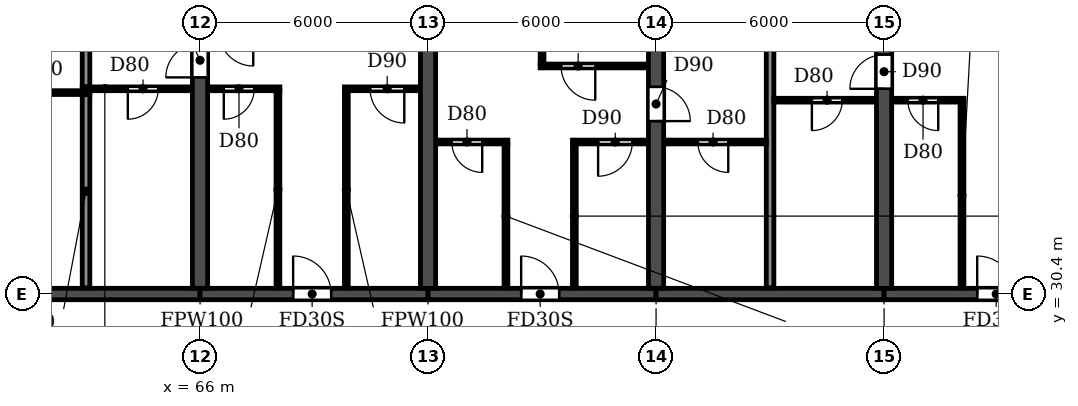
"""IFC4 building model, lengths in metres.
Left out: names, types, materials, properties, quantities, classifications, styles, units other than length and angle.
Written with IfcOpenShell. Run it as: python <this file> out.ifc"""

import sys

from ifc_helpers import new_model, si_unit, direction, frame, frame_2d, origin, place, context, subcontext, project, spatial, rectangle, extrude, element, fill, save


model = new_model("IFC4")
c1 = context("Model", 3, precision=1e-05, world=origin(), true_north=direction((0.0, 1.0)))
c2 = subcontext(c1, "Body", "Model", "MODEL_VIEW")
j1 = project(units=[si_unit("LENGTHUNIT", "METRE"), si_unit("PLANEANGLEUNIT", "RADIAN")], contexts=[c1])
p1 = place(None, origin())
s1 = spatial("IfcSite", under=j1, at=p1, CompositionType="ELEMENT")
p2 = place(p1, origin())
s2 = spatial("IfcBuilding", under=s1, at=p2, CompositionType="ELEMENT")
p3 = place(p2, frame((0.0, 0.0, 49.8)))
s3 = spatial("IfcBuildingStorey", under=s2, at=p3, CompositionType="ELEMENT", Elevation=49.8)
p4 = place(p3, frame((66.0, 30.55, 0.0), z_axis=(0.0, 0.0, 1.0), x_axis=(0.0, 1.0, 0.0)))
e1 = element("IfcWall", 1, at=p4, inside=s3, PredefinedType="SHEAR", context=c2, shape_type="SweptSolid", body=[
    extrude(rectangle(XDim=14.05, YDim=0.4, at=frame_2d((7.025, 0.0))), origin(), (0.0, 0.0, 1.0), 3.0),
])
p5 = place(p4, frame((5.55, 0.0, 0.0)))
e2 = element("IfcOpeningElement", 2, at=p5, cuts=e1, PredefinedType="OPENING", context=c2, shape_type="SweptSolid", body=[
    extrude(rectangle(XDim=0.9, YDim=2.1, at=frame_2d((0.45, 1.05))), frame((0.0, 0.21, 0.0), z_axis=(0.0, -1.0, 0.0), x_axis=(1.0, 0.0, 0.0)), (0.0, 0.0, 1.0), 0.42),
])
p6 = place(p3, frame((72.0, 30.55, 0.0), z_axis=(0.0, 0.0, 1.0), x_axis=(0.0, 1.0, 0.0)))
e3 = element("IfcWall", 3, at=p6, inside=s3, PredefinedType="SHEAR", context=c2, shape_type="SweptSolid", body=[
    extrude(rectangle(XDim=14.05, YDim=0.4, at=frame_2d((7.025, 0.0))), origin(), (0.0, 0.0, 1.0), 3.0),
])
p7 = place(p3, frame((78.0, 30.55, 0.0), z_axis=(0.0, 0.0, 1.0), x_axis=(0.0, 1.0, 0.0)))
e4 = element("IfcWall", 4, at=p7, inside=s3, PredefinedType="SHEAR", context=c2, shape_type="SweptSolid", body=[
    extrude(rectangle(XDim=14.05, YDim=0.4, at=frame_2d((7.025, 0.0))), origin(), (0.0, 0.0, 1.0), 3.0),
])
p8 = place(p7, frame((4.4, 0.0, 0.0)))
e5 = element("IfcOpeningElement", 5, at=p8, cuts=e4, PredefinedType="OPENING", context=c2, shape_type="SweptSolid", body=[
    extrude(rectangle(XDim=0.9, YDim=2.1, at=frame_2d((0.45, 1.05))), frame((0.0, 0.21, 0.0), z_axis=(0.0, -1.0, 0.0), x_axis=(1.0, 0.0, 0.0)), (0.0, 0.0, 1.0), 0.42),
])
p9 = place(p3, frame((84.0, 30.55, 0.0), z_axis=(0.0, 0.0, 1.0), x_axis=(0.0, 1.0, 0.0)))
e6 = element("IfcWall", 6, at=p9, inside=s3, PredefinedType="SHEAR", context=c2, shape_type="SweptSolid", body=[
    extrude(rectangle(XDim=14.05, YDim=0.4, at=frame_2d((7.025, 0.0))), origin(), (0.0, 0.0, 1.0), 3.0),
])
p10 = place(p9, frame((5.25, 0.0, 0.0)))
e7 = element("IfcOpeningElement", 7, at=p10, cuts=e6, PredefinedType="OPENING", context=c2, shape_type="SweptSolid", body=[
    extrude(rectangle(XDim=0.9, YDim=2.1, at=frame_2d((0.45, 1.05))), frame((0.0, 0.21, 0.0), z_axis=(0.0, -1.0, 0.0), x_axis=(1.0, 0.0, 0.0)), (0.0, 0.0, 1.0), 0.42),
])
p11 = place(p3, frame((60.0, 30.4, 0.0), z_axis=(0.0, 0.0, 1.0), x_axis=(1.0, 0.0, 0.0)))
e8 = element("IfcWall", 8, at=p11, inside=s3, PredefinedType="SHEAR", context=c2, shape_type="SweptSolid", body=[
    extrude(rectangle(XDim=6.0, YDim=0.3, at=frame_2d((3.0, 0.0))), origin(), (0.0, 0.0, 1.0), 2.4),
])
p12 = place(p3, frame((66.0, 30.4, 0.0), z_axis=(0.0, 0.0, 1.0), x_axis=(1.0, 0.0, 0.0)))
e9 = element("IfcWall", 9, at=p12, inside=s3, PredefinedType="SHEAR", context=c2, shape_type="SweptSolid", body=[
    extrude(rectangle(XDim=6.0, YDim=0.3, at=frame_2d((3.0, 0.0))), origin(), (0.0, 0.0, 1.0), 2.4),
])
p13 = place(p12, frame((2.45, 0.0, 0.0)))
e10 = element("IfcOpeningElement", 10, at=p13, cuts=e9, PredefinedType="OPENING", context=c2, shape_type="SweptSolid", body=[
    extrude(rectangle(XDim=1.0, YDim=2.1, at=frame_2d((0.5, 1.05))), frame((0.0, 0.16, 0.0), z_axis=(0.0, -1.0, 0.0), x_axis=(1.0, 0.0, 0.0)), (0.0, 0.0, 1.0), 0.32),
])
p14 = place(p3, frame((72.0, 30.4, 0.0), z_axis=(0.0, 0.0, 1.0), x_axis=(1.0, 0.0, 0.0)))
e11 = element("IfcWall", 11, at=p14, inside=s3, PredefinedType="SHEAR", context=c2, shape_type="SweptSolid", body=[
    extrude(rectangle(XDim=6.0, YDim=0.3, at=frame_2d((3.0, 0.0))), origin(), (0.0, 0.0, 1.0), 2.4),
])
p15 = place(p14, frame((2.45, 0.0, 0.0)))
e12 = element("IfcOpeningElement", 12, at=p15, cuts=e11, PredefinedType="OPENING", context=c2, shape_type="SweptSolid", body=[
    extrude(rectangle(XDim=1.0, YDim=2.1, at=frame_2d((0.5, 1.05))), frame((0.0, 0.16, 0.0), z_axis=(0.0, -1.0, 0.0), x_axis=(1.0, 0.0, 0.0)), (0.0, 0.0, 1.0), 0.32),
])
p16 = place(p3, frame((78.0, 30.4, 0.0), z_axis=(0.0, 0.0, 1.0), x_axis=(1.0, 0.0, 0.0)))
e13 = element("IfcWall", 13, at=p16, inside=s3, PredefinedType="SHEAR", context=c2, shape_type="SweptSolid", body=[
    extrude(rectangle(XDim=6.0, YDim=0.3, at=frame_2d((3.0, 0.0))), origin(), (0.0, 0.0, 1.0), 2.4),
])
p17 = place(p3, frame((84.0, 30.4, 0.0), z_axis=(0.0, 0.0, 1.0), x_axis=(1.0, 0.0, 0.0)))
e14 = element("IfcWall", 14, at=p17, inside=s3, PredefinedType="SHEAR", context=c2, shape_type="SweptSolid", body=[
    extrude(rectangle(XDim=6.0, YDim=0.3, at=frame_2d((3.0, 0.0))), origin(), (0.0, 0.0, 1.0), 2.4),
])
p18 = place(p17, frame((2.45, 0.0, 0.0)))
e15 = element("IfcOpeningElement", 15, at=p18, cuts=e14, PredefinedType="OPENING", context=c2, shape_type="SweptSolid", body=[
    extrude(rectangle(XDim=1.0, YDim=2.1, at=frame_2d((0.5, 1.05))), frame((0.0, 0.16, 0.0), z_axis=(0.0, -1.0, 0.0), x_axis=(1.0, 0.0, 0.0)), (0.0, 0.0, 1.0), 0.32),
])
p19 = place(p3, frame((63.0, 30.56, 0.0), z_axis=(0.0, 0.0, 1.0), x_axis=(0.0, 1.0, 0.0)))
e16 = element("IfcWall", 16, at=p19, inside=s3, PredefinedType="PARTITIONING", context=c2, shape_type="SweptSolid", body=[
    extrude(rectangle(XDim=5.09, YDim=0.2, at=frame_2d((2.545, 0.0))), origin(), (0.0, 0.0, 1.0), 3.0),
])
p20 = place(p3, frame((63.0, 35.85, 0.0), z_axis=(0.0, 0.0, 1.0), x_axis=(0.0, 1.0, 0.0)))
e17 = element("IfcWall", 17, at=p20, inside=s3, PredefinedType="PARTITIONING", context=c2, shape_type="SweptSolid", body=[
    extrude(rectangle(XDim=8.89, YDim=0.2, at=frame_2d((4.445, 0.0))), origin(), (0.0, 0.0, 1.0), 3.0),
])
p21 = place(p3, frame((81.0, 30.56, 0.0), z_axis=(0.0, 0.0, 1.0), x_axis=(0.0, 1.0, 0.0)))
e18 = element("IfcWall", 18, at=p21, inside=s3, PredefinedType="PARTITIONING", context=c2, shape_type="SweptSolid", body=[
    extrude(rectangle(XDim=14.18, YDim=0.2, at=frame_2d((7.09, 0.0))), origin(), (0.0, 0.0, 1.0), 3.0),
])
p22 = place(p3, frame((72.21, 34.4, 0.0), z_axis=(0.0, 0.0, 1.0), x_axis=(1.0, 0.0, 0.0)))
e19 = element("IfcWall", 19, at=p22, inside=s3, PredefinedType="PARTITIONING", context=c2, shape_type="SweptSolid", body=[
    extrude(rectangle(XDim=1.89, YDim=0.1, at=frame_2d((0.945, 0.0))), origin(), (0.0, 0.0, 1.0), 3.0),
])
p23 = place(p22, frame((0.415, 0.0, 0.0)))
e20 = element("IfcOpeningElement", 20, at=p23, cuts=e19, PredefinedType="OPENING", context=c2, shape_type="SweptSolid", body=[
    extrude(rectangle(XDim=0.8, YDim=2.1, at=frame_2d((0.4, 1.05))), frame((0.0, 0.06, 0.0), z_axis=(0.0, -1.0, 0.0), x_axis=(1.0, 0.0, 0.0)), (0.0, 0.0, 1.0), 0.12),
])
p24 = place(p3, frame((75.8, 34.4, 0.0), z_axis=(0.0, 0.0, 1.0), x_axis=(1.0, 0.0, 0.0)))
e21 = element("IfcWall", 21, at=p24, inside=s3, PredefinedType="PARTITIONING", context=c2, shape_type="SweptSolid", body=[
    extrude(rectangle(XDim=1.99, YDim=0.1, at=frame_2d((0.995, 0.0))), origin(), (0.0, 0.0, 1.0), 3.0),
])
p25 = place(p24, frame((0.675, 0.0, 0.0)))
e22 = element("IfcOpeningElement", 22, at=p25, cuts=e21, PredefinedType="OPENING", context=c2, shape_type="SweptSolid", body=[
    extrude(rectangle(XDim=0.9, YDim=2.1, at=frame_2d((0.45, 1.05))), frame((0.0, 0.06, 0.0), z_axis=(0.0, -1.0, 0.0), x_axis=(1.0, 0.0, 0.0)), (0.0, 0.0, 1.0), 0.12),
])
p26 = place(p3, frame((78.21, 34.4, 0.0), z_axis=(0.0, 0.0, 1.0), x_axis=(1.0, 0.0, 0.0)))
e23 = element("IfcWall", 23, at=p26, inside=s3, PredefinedType="PARTITIONING", context=c2, shape_type="SweptSolid", body=[
    extrude(rectangle(XDim=2.69, YDim=0.1, at=frame_2d((1.345, 0.0))), origin(), (0.0, 0.0, 1.0), 3.0),
])
p27 = place(p26, frame((0.89, 0.0, 0.0)))
e24 = element("IfcOpeningElement", 24, at=p27, cuts=e23, PredefinedType="OPENING", context=c2, shape_type="SweptSolid", body=[
    extrude(rectangle(XDim=0.8, YDim=2.1, at=frame_2d((0.4, 1.05))), frame((0.0, 0.06, 0.0), z_axis=(0.0, -1.0, 0.0), x_axis=(1.0, 0.0, 0.0)), (0.0, 0.0, 1.0), 0.12),
])
p28 = place(p3, frame((81.1, 35.5, 0.0), z_axis=(0.0, 0.0, 1.0), x_axis=(1.0, 0.0, 0.0)))
e25 = element("IfcWall", 25, at=p28, inside=s3, PredefinedType="PARTITIONING", context=c2, shape_type="SweptSolid", body=[
    extrude(rectangle(XDim=2.69, YDim=0.1, at=frame_2d((1.345, 0.0))), origin(), (0.0, 0.0, 1.0), 3.0),
])
p29 = place(p28, frame((1.0, 0.0, 0.0)))
e26 = element("IfcOpeningElement", 26, at=p29, cuts=e25, PredefinedType="OPENING", context=c2, shape_type="SweptSolid", body=[
    extrude(rectangle(XDim=0.8, YDim=2.1, at=frame_2d((0.4, 1.05))), frame((0.0, 0.06, 0.0), z_axis=(0.0, -1.0, 0.0), x_axis=(1.0, 0.0, 0.0)), (0.0, 0.0, 1.0), 0.12),
])
p30 = place(p3, frame((84.21, 35.5, 0.0), z_axis=(0.0, 0.0, 1.0), x_axis=(1.0, 0.0, 0.0)))
e27 = element("IfcWall", 27, at=p30, inside=s3, PredefinedType="PARTITIONING", context=c2, shape_type="SweptSolid", body=[
    extrude(rectangle(XDim=1.89, YDim=0.1, at=frame_2d((0.945, 0.0))), origin(), (0.0, 0.0, 1.0), 3.0),
])
p31 = place(p30, frame((0.415, 0.0, 0.0)))
e28 = element("IfcOpeningElement", 28, at=p31, cuts=e27, PredefinedType="OPENING", context=c2, shape_type="SweptSolid", body=[
    extrude(rectangle(XDim=0.8, YDim=2.1, at=frame_2d((0.4, 1.05))), frame((0.0, 0.06, 0.0), z_axis=(0.0, -1.0, 0.0), x_axis=(1.0, 0.0, 0.0)), (0.0, 0.0, 1.0), 0.12),
])
p32 = place(p3, frame((60.21, 35.7, 0.0), z_axis=(0.0, 0.0, 1.0), x_axis=(1.0, 0.0, 0.0)))
e29 = element("IfcWall", 29, at=p32, inside=s3, PredefinedType="PARTITIONING", context=c2, shape_type="SweptSolid", body=[
    extrude(rectangle(XDim=2.89, YDim=0.1, at=frame_2d((1.445, 0.0))), origin(), (0.0, 0.0, 1.0), 3.0),
])
p33 = place(p32, frame((0.89, 0.0, 0.0)))
e30 = element("IfcOpeningElement", 30, at=p33, cuts=e29, PredefinedType="OPENING", context=c2, shape_type="SweptSolid", body=[
    extrude(rectangle(XDim=0.8, YDim=2.1, at=frame_2d((0.4, 1.05))), frame((0.0, 0.06, 0.0), z_axis=(0.0, -1.0, 0.0), x_axis=(1.0, 0.0, 0.0)), (0.0, 0.0, 1.0), 0.12),
])
p34 = place(p3, frame((62.9, 35.8, 0.0), z_axis=(0.0, 0.0, 1.0), x_axis=(1.0, 0.0, 0.0)))
e31 = element("IfcWall", 31, at=p34, inside=s3, PredefinedType="PARTITIONING", context=c2, shape_type="SweptSolid", body=[
    extrude(rectangle(XDim=2.89, YDim=0.1, at=frame_2d((1.445, 0.0))), origin(), (0.0, 0.0, 1.0), 3.0),
])
p35 = place(p34, frame((1.2, 0.0, 0.0)))
e32 = element("IfcOpeningElement", 32, at=p35, cuts=e31, PredefinedType="OPENING", context=c2, shape_type="SweptSolid", body=[
    extrude(rectangle(XDim=0.8, YDim=2.1, at=frame_2d((0.4, 1.05))), frame((0.0, 0.06, 0.0), z_axis=(0.0, -1.0, 0.0), x_axis=(1.0, 0.0, 0.0)), (0.0, 0.0, 1.0), 0.12),
])
p36 = place(p3, frame((66.21, 35.8, 0.0), z_axis=(0.0, 0.0, 1.0), x_axis=(1.0, 0.0, 0.0)))
e33 = element("IfcWall", 33, at=p36, inside=s3, PredefinedType="PARTITIONING", context=c2, shape_type="SweptSolid", body=[
    extrude(rectangle(XDim=1.89, YDim=0.1, at=frame_2d((0.945, 0.0))), origin(), (0.0, 0.0, 1.0), 3.0),
])
p37 = place(p36, frame((0.415, 0.0, 0.0)))
e34 = element("IfcOpeningElement", 34, at=p37, cuts=e33, PredefinedType="OPENING", context=c2, shape_type="SweptSolid", body=[
    extrude(rectangle(XDim=0.8, YDim=2.1, at=frame_2d((0.4, 1.05))), frame((0.0, 0.06, 0.0), z_axis=(0.0, -1.0, 0.0), x_axis=(1.0, 0.0, 0.0)), (0.0, 0.0, 1.0), 0.12),
])
p38 = place(p3, frame((69.8, 35.8, 0.0), z_axis=(0.0, 0.0, 1.0), x_axis=(1.0, 0.0, 0.0)))
e35 = element("IfcWall", 35, at=p38, inside=s3, PredefinedType="PARTITIONING", context=c2, shape_type="SweptSolid", body=[
    extrude(rectangle(XDim=1.99, YDim=0.1, at=frame_2d((0.995, 0.0))), origin(), (0.0, 0.0, 1.0), 3.0),
])
p39 = place(p38, frame((0.675, 0.0, 0.0)))
e36 = element("IfcOpeningElement", 36, at=p39, cuts=e35, PredefinedType="OPENING", context=c2, shape_type="SweptSolid", body=[
    extrude(rectangle(XDim=0.9, YDim=2.1, at=frame_2d((0.45, 1.05))), frame((0.0, 0.06, 0.0), z_axis=(0.0, -1.0, 0.0), x_axis=(1.0, 0.0, 0.0)), (0.0, 0.0, 1.0), 0.12),
])
p40 = place(p3, frame((74.95, 36.4, 0.0), z_axis=(0.0, 0.0, 1.0), x_axis=(1.0, 0.0, 0.0)))
e37 = element("IfcWall", 37, at=p40, inside=s3, PredefinedType="PARTITIONING", context=c2, shape_type="SweptSolid", body=[
    extrude(rectangle(XDim=2.84, YDim=0.1, at=frame_2d((1.42, 0.0))), origin(), (0.0, 0.0, 1.0), 3.0),
])
p41 = place(p40, frame((0.55, 0.0, 0.0)))
e38 = element("IfcOpeningElement", 38, at=p41, cuts=e37, PredefinedType="OPENING", context=c2, shape_type="SweptSolid", body=[
    extrude(rectangle(XDim=0.9, YDim=2.1, at=frame_2d((0.45, 1.05))), frame((0.0, 0.06, 0.0), z_axis=(0.0, -1.0, 0.0), x_axis=(1.0, 0.0, 0.0)), (0.0, 0.0, 1.0), 0.12),
])
for number, where, z_axis, x_axis in (
    (39, (68.05, 30.56, 0.0), (0.0, 0.0, 1.0), (0.0, 1.0, 0.0)),
    (40, (69.85, 30.56, 0.0), (0.0, 0.0, 1.0), (0.0, 1.0, 0.0)),
):
    element("IfcWall", number, at=place(p3, frame(where, z_axis=z_axis, x_axis=x_axis)), inside=s3, PredefinedType="PARTITIONING", context=c2, shape_type="SweptSolid", body=[
        extrude(rectangle(XDim=5.19, YDim=0.1, at=frame_2d((2.595, 0.0))), origin(), (0.0, 0.0, 1.0), 3.0),
    ])
p42 = place(p3, frame((74.05, 30.56, 0.0), z_axis=(0.0, 0.0, 1.0), x_axis=(0.0, 1.0, 0.0)))
e41 = element("IfcWall", 41, at=p42, inside=s3, PredefinedType="PARTITIONING", context=c2, shape_type="SweptSolid", body=[
    extrude(rectangle(XDim=3.79, YDim=0.1, at=frame_2d((1.895, 0.0))), origin(), (0.0, 0.0, 1.0), 3.0),
])
p43 = place(p3, frame((75.0, 36.45, 0.0), z_axis=(0.0, 0.0, 1.0), x_axis=(0.0, 1.0, 0.0)))
e42 = element("IfcWall", 42, at=p43, inside=s3, PredefinedType="PARTITIONING", context=c2, shape_type="SweptSolid", body=[
    extrude(rectangle(XDim=8.29, YDim=0.1, at=frame_2d((4.145, 0.0))), origin(), (0.0, 0.0, 1.0), 3.0),
])
p44 = place(p3, frame((75.85, 30.56, 0.0), z_axis=(0.0, 0.0, 1.0), x_axis=(0.0, 1.0, 0.0)))
e43 = element("IfcWall", 43, at=p44, inside=s3, PredefinedType="PARTITIONING", context=c2, shape_type="SweptSolid", body=[
    extrude(rectangle(XDim=3.79, YDim=0.1, at=frame_2d((1.895, 0.0))), origin(), (0.0, 0.0, 1.0), 3.0),
])
p45 = place(p3, frame((86.05, 30.56, 0.0), z_axis=(0.0, 0.0, 1.0), x_axis=(0.0, 1.0, 0.0)))
e44 = element("IfcWall", 44, at=p45, inside=s3, PredefinedType="PARTITIONING", context=c2, shape_type="SweptSolid", body=[
    extrude(rectangle(XDim=4.89, YDim=0.1, at=frame_2d((2.445, 0.0))), origin(), (0.0, 0.0, 1.0), 3.0),
])
p46 = place(p35, frame((0.8, 0.0, 0.0), z_axis=(0.0, 0.0, 1.0), x_axis=(-1.0, 0.0, 0.0)))
e45 = element("IfcDoor", 45, at=p46, inside=s3, OperationType="SINGLE_SWING_RIGHT", PredefinedType="DOOR", context=c2, shape_type="SweptSolid", body=[
    extrude(rectangle(XDim=0.8, YDim=2.1, at=frame_2d((0.4, 1.05))), frame((0.0, 0.025, 0.0), z_axis=(0.0, -1.0, 0.0), x_axis=(1.0, 0.0, 0.0)), (0.0, 0.0, 1.0), 0.05),
])
fill(e32, e45)
p47 = place(p5, origin())
e46 = element("IfcDoor", 46, at=p47, inside=s3, OperationType="SINGLE_SWING_LEFT", PredefinedType="DOOR", context=c2, shape_type="SweptSolid", body=[
    extrude(rectangle(XDim=0.9, YDim=2.1, at=frame_2d((0.45, 1.05))), frame((0.0, 0.025, 0.0), z_axis=(0.0, -1.0, 0.0), x_axis=(1.0, 0.0, 0.0)), (0.0, 0.0, 1.0), 0.05),
])
fill(e2, e46)
p48 = place(p37, frame((0.8, 0.0, 0.0), z_axis=(0.0, 0.0, 1.0), x_axis=(-1.0, 0.0, 0.0)))
e47 = element("IfcDoor", 47, at=p48, inside=s3, OperationType="SINGLE_SWING_RIGHT", PredefinedType="DOOR", context=c2, shape_type="SweptSolid", body=[
    extrude(rectangle(XDim=0.8, YDim=2.1, at=frame_2d((0.4, 1.05))), frame((0.0, 0.025, 0.0), z_axis=(0.0, -1.0, 0.0), x_axis=(1.0, 0.0, 0.0)), (0.0, 0.0, 1.0), 0.05),
])
fill(e34, e47)
p49 = place(p13, origin())
e48 = element("IfcDoor", 48, at=p49, inside=s3, OperationType="SINGLE_SWING_LEFT", PredefinedType="DOOR", context=c2, shape_type="SweptSolid", body=[
    extrude(rectangle(XDim=1.0, YDim=2.1, at=frame_2d((0.5, 1.05))), frame((0.0, 0.025, 0.0), z_axis=(0.0, -1.0, 0.0), x_axis=(1.0, 0.0, 0.0)), (0.0, 0.0, 1.0), 0.05),
])
fill(e10, e48)
p50 = place(p39, frame((0.9, 0.0, 0.0), z_axis=(0.0, 0.0, 1.0), x_axis=(-1.0, 0.0, 0.0)))
e49 = element("IfcDoor", 49, at=p50, inside=s3, OperationType="SINGLE_SWING_LEFT", PredefinedType="DOOR", context=c2, shape_type="SweptSolid", body=[
    extrude(rectangle(XDim=0.9, YDim=2.1, at=frame_2d((0.45, 1.05))), frame((0.0, 0.025, 0.0), z_axis=(0.0, -1.0, 0.0), x_axis=(1.0, 0.0, 0.0)), (0.0, 0.0, 1.0), 0.05),
])
fill(e36, e49)
p51 = place(p27, frame((0.8, 0.0, 0.0), z_axis=(0.0, 0.0, 1.0), x_axis=(-1.0, 0.0, 0.0)))
e50 = element("IfcDoor", 50, at=p51, inside=s3, OperationType="SINGLE_SWING_LEFT", PredefinedType="DOOR", context=c2, shape_type="SweptSolid", body=[
    extrude(rectangle(XDim=0.8, YDim=2.1, at=frame_2d((0.4, 1.05))), frame((0.0, 0.025, 0.0), z_axis=(0.0, -1.0, 0.0), x_axis=(1.0, 0.0, 0.0)), (0.0, 0.0, 1.0), 0.05),
])
fill(e24, e50)
p52 = place(p23, frame((0.8, 0.0, 0.0), z_axis=(0.0, 0.0, 1.0), x_axis=(-1.0, 0.0, 0.0)))
e51 = element("IfcDoor", 51, at=p52, inside=s3, OperationType="SINGLE_SWING_LEFT", PredefinedType="DOOR", context=c2, shape_type="SweptSolid", body=[
    extrude(rectangle(XDim=0.8, YDim=2.1, at=frame_2d((0.4, 1.05))), frame((0.0, 0.025, 0.0), z_axis=(0.0, -1.0, 0.0), x_axis=(1.0, 0.0, 0.0)), (0.0, 0.0, 1.0), 0.05),
])
fill(e20, e51)
p53 = place(p15, origin())
e52 = element("IfcDoor", 52, at=p53, inside=s3, OperationType="SINGLE_SWING_LEFT", PredefinedType="DOOR", context=c2, shape_type="SweptSolid", body=[
    extrude(rectangle(XDim=1.0, YDim=2.1, at=frame_2d((0.5, 1.05))), frame((0.0, 0.025, 0.0), z_axis=(0.0, -1.0, 0.0), x_axis=(1.0, 0.0, 0.0)), (0.0, 0.0, 1.0), 0.05),
])
fill(e12, e52)
p54 = place(p41, frame((0.9, 0.0, 0.0), z_axis=(0.0, 0.0, 1.0), x_axis=(-1.0, 0.0, 0.0)))
e53 = element("IfcDoor", 53, at=p54, inside=s3, OperationType="SINGLE_SWING_LEFT", PredefinedType="DOOR", context=c2, shape_type="SweptSolid", body=[
    extrude(rectangle(XDim=0.9, YDim=2.1, at=frame_2d((0.45, 1.05))), frame((0.0, 0.025, 0.0), z_axis=(0.0, -1.0, 0.0), x_axis=(1.0, 0.0, 0.0)), (0.0, 0.0, 1.0), 0.05),
])
fill(e38, e53)
p55 = place(p25, frame((0.9, 0.0, 0.0), z_axis=(0.0, 0.0, 1.0), x_axis=(-1.0, 0.0, 0.0)))
e54 = element("IfcDoor", 54, at=p55, inside=s3, OperationType="SINGLE_SWING_RIGHT", PredefinedType="DOOR", context=c2, shape_type="SweptSolid", body=[
    extrude(rectangle(XDim=0.9, YDim=2.1, at=frame_2d((0.45, 1.05))), frame((0.0, 0.025, 0.0), z_axis=(0.0, -1.0, 0.0), x_axis=(1.0, 0.0, 0.0)), (0.0, 0.0, 1.0), 0.05),
])
fill(e22, e54)
p56 = place(p8, frame((0.9, 0.0, 0.0), z_axis=(0.0, 0.0, 1.0), x_axis=(-1.0, 0.0, 0.0)))
e55 = element("IfcDoor", 55, at=p56, inside=s3, OperationType="SINGLE_SWING_RIGHT", PredefinedType="DOOR", context=c2, shape_type="SweptSolid", body=[
    extrude(rectangle(XDim=0.9, YDim=2.1, at=frame_2d((0.45, 1.05))), frame((0.0, 0.025, 0.0), z_axis=(0.0, -1.0, 0.0), x_axis=(1.0, 0.0, 0.0)), (0.0, 0.0, 1.0), 0.05),
])
fill(e5, e55)
p57 = place(p29, frame((0.8, 0.0, 0.0), z_axis=(0.0, 0.0, 1.0), x_axis=(-1.0, 0.0, 0.0)))
e56 = element("IfcDoor", 56, at=p57, inside=s3, OperationType="SINGLE_SWING_RIGHT", PredefinedType="DOOR", context=c2, shape_type="SweptSolid", body=[
    extrude(rectangle(XDim=0.8, YDim=2.1, at=frame_2d((0.4, 1.05))), frame((0.0, 0.025, 0.0), z_axis=(0.0, -1.0, 0.0), x_axis=(1.0, 0.0, 0.0)), (0.0, 0.0, 1.0), 0.05),
])
fill(e26, e56)
p58 = place(p10, origin())
e57 = element("IfcDoor", 57, at=p58, inside=s3, OperationType="SINGLE_SWING_LEFT", PredefinedType="DOOR", context=c2, shape_type="SweptSolid", body=[
    extrude(rectangle(XDim=0.9, YDim=2.1, at=frame_2d((0.45, 1.05))), frame((0.0, 0.025, 0.0), z_axis=(0.0, -1.0, 0.0), x_axis=(1.0, 0.0, 0.0)), (0.0, 0.0, 1.0), 0.05),
])
fill(e7, e57)
p59 = place(p31, frame((0.8, 0.0, 0.0), z_axis=(0.0, 0.0, 1.0), x_axis=(-1.0, 0.0, 0.0)))
e58 = element("IfcDoor", 58, at=p59, inside=s3, OperationType="SINGLE_SWING_LEFT", PredefinedType="DOOR", context=c2, shape_type="SweptSolid", body=[
    extrude(rectangle(XDim=0.8, YDim=2.1, at=frame_2d((0.4, 1.05))), frame((0.0, 0.025, 0.0), z_axis=(0.0, -1.0, 0.0), x_axis=(1.0, 0.0, 0.0)), (0.0, 0.0, 1.0), 0.05),
])
fill(e28, e58)
p60 = place(p18, origin())
e59 = element("IfcDoor", 59, at=p60, inside=s3, OperationType="SINGLE_SWING_LEFT", PredefinedType="DOOR", context=c2, shape_type="SweptSolid", body=[
    extrude(rectangle(XDim=1.0, YDim=2.1, at=frame_2d((0.5, 1.05))), frame((0.0, 0.025, 0.0), z_axis=(0.0, -1.0, 0.0), x_axis=(1.0, 0.0, 0.0)), (0.0, 0.0, 1.0), 0.05),
])
fill(e15, e59)
save(model, sys.argv[1])
